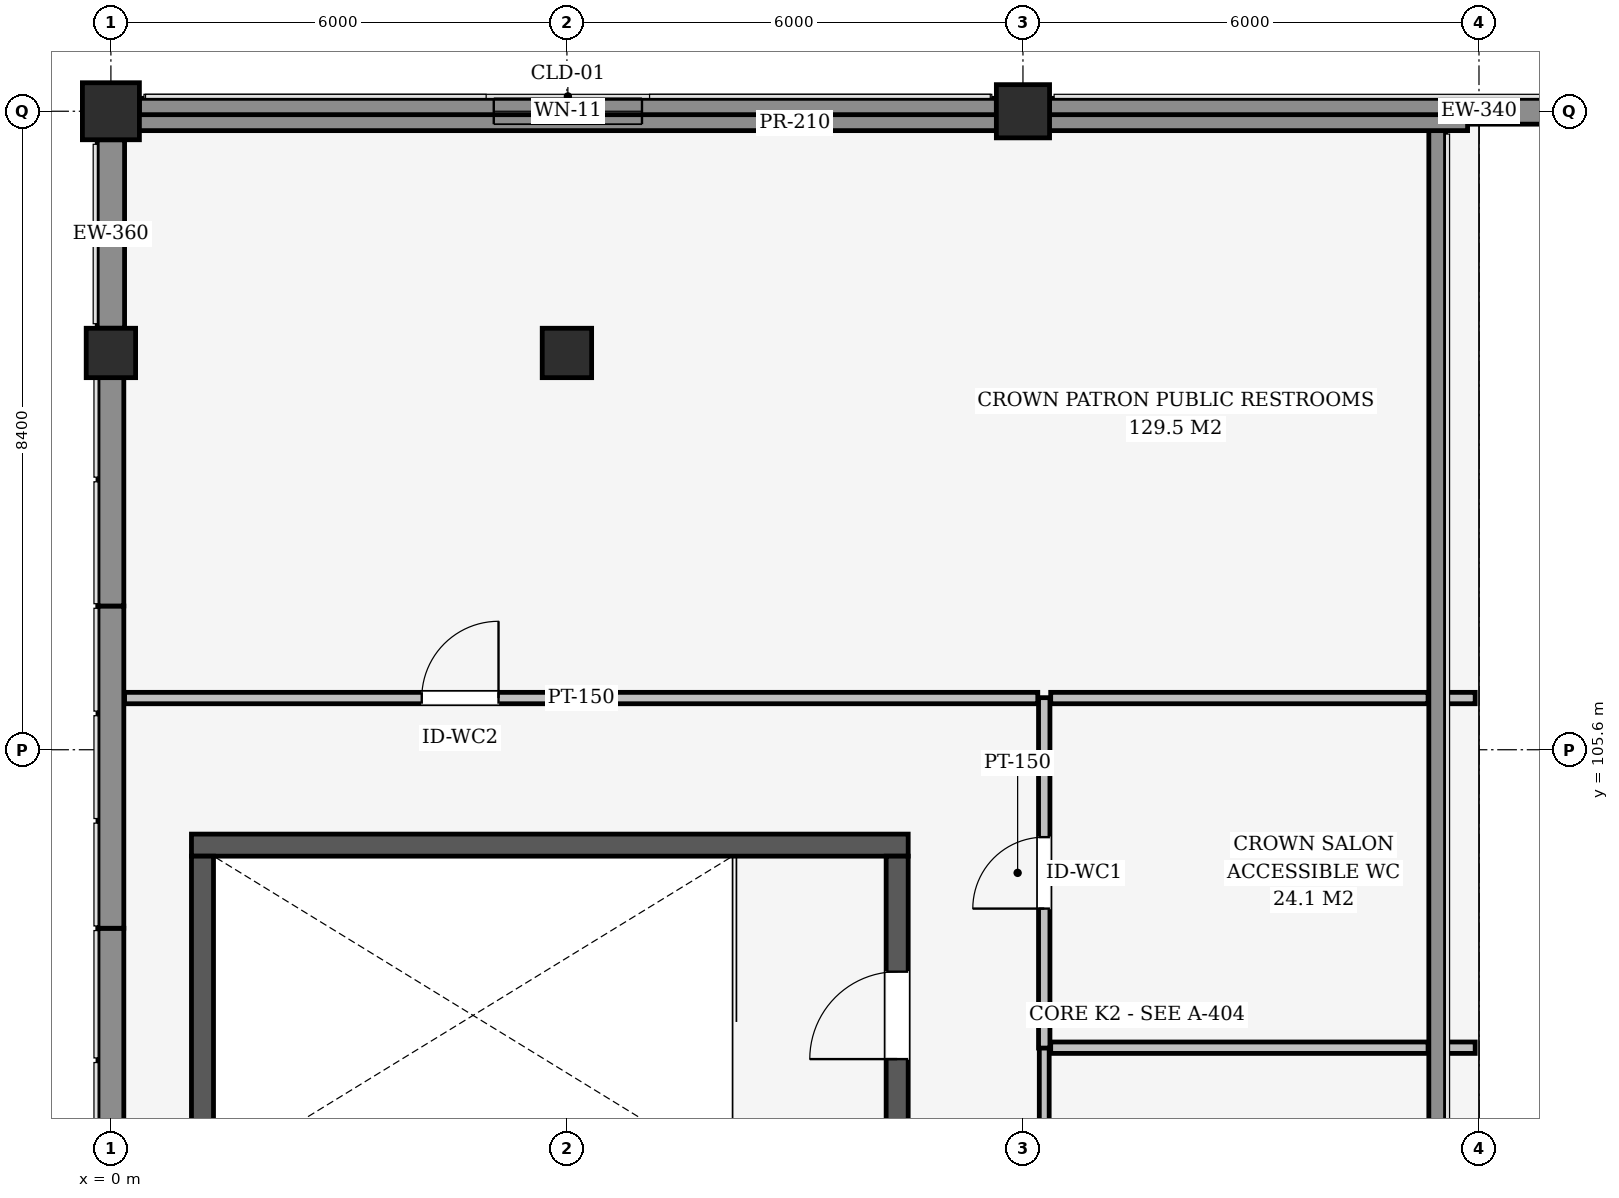
"""IFC4 building model, lengths in metres.
Left out: names, types, materials, properties, quantities, classifications, styles, units other than length and angle.
Written with IfcOpenShell. Run it as: python <this file> out.ifc"""

import sys

from ifc_helpers import new_model, si_unit, direction, frame, frame_2d, origin, origin_2d, place, context, subcontext, project, spatial, polyline, rectangle, outline, extrude, element, fill, save


model = new_model("IFC4")
c1 = context("Model", 3, precision=1e-05, world=origin(), true_north=direction((0.0, 1.0)))
c2 = subcontext(c1, "Body", "Model", "MODEL_VIEW")
j1 = project(units=[si_unit("LENGTHUNIT", "METRE"), si_unit("PLANEANGLEUNIT", "RADIAN")], contexts=[c1])
p1 = place(None, origin())
s1 = spatial("IfcSite", under=j1, at=p1, CompositionType="ELEMENT")
p2 = place(p1, origin())
s2 = spatial("IfcBuilding", under=s1, at=p2, CompositionType="ELEMENT")
p3 = place(p2, frame((0.0, 0.0, 22.2)))
s3 = spatial("IfcBuildingStorey", under=s2, at=p3, CompositionType="ELEMENT", Elevation=22.2)
p4 = place(p3, frame((0.0, 114.0, 0.0), z_axis=(0.0, 0.0, 1.0), x_axis=(1.0, 0.0, 0.0)))
e1 = element("IfcColumn", 1, at=p4, inside=s3, PredefinedType="COLUMN", context=c2, shape_type="SweptSolid", body=[
    extrude(rectangle(XDim=0.75, YDim=0.75, at=origin_2d()), origin(), (0.0, 0.0, 1.0), 4.37),
])
p5 = place(p3, frame((12.0, 114.0, 0.0), z_axis=(0.0, 0.0, 1.0), x_axis=(1.0, 0.0, 0.0)))
e2 = element("IfcColumn", 2, at=p5, inside=s3, PredefinedType="COLUMN", context=c2, shape_type="SweptSolid", body=[
    extrude(rectangle(XDim=0.7, YDim=0.7, at=origin_2d()), origin(), (0.0, 0.0, 1.0), 4.37),
])
for number, where, z_axis, x_axis in (
    (3, (0.0, 110.82, 0.0), (0.0, 0.0, 1.0), (1.0, 0.0, 0.0)),
    (4, (6.0, 110.82, 0.0), (0.0, 0.0, 1.0), (1.0, 0.0, 0.0)),
):
    element("IfcColumn", number, at=place(p3, frame(where, z_axis=z_axis, x_axis=x_axis)), inside=s3, PredefinedType="COLUMN", context=c2, shape_type="SweptSolid", body=[
        extrude(rectangle(XDim=0.65, YDim=0.65, at=origin_2d()), origin(), (0.0, 0.0, 1.0), 4.37),
    ])
p6 = place(p3, frame((0.375, 114.0, 0.0), z_axis=(0.0, 0.0, 1.0), x_axis=(1.0, 0.0, 0.0)))
e5 = element("IfcWall", 5, at=p6, inside=s3, PredefinedType="SOLIDWALL", context=c2, shape_type="SweptSolid", body=[
    extrude(rectangle(XDim=11.275, YDim=0.34, at=frame_2d((5.637, 0.0))), origin(), (0.0, 0.0, 1.0), 3.977),
])
p7 = place(p6, frame((4.663, 0.0, 0.85)))
e6 = element("IfcOpeningElement", 6, at=p7, cuts=e5, PredefinedType="OPENING", context=c2, shape_type="SweptSolid", body=[
    extrude(rectangle(XDim=1.95, YDim=1.75, at=frame_2d((0.975, 0.875))), frame((0.0, 0.18, 0.0), z_axis=(0.0, -1.0, 0.0), x_axis=(1.0, 0.0, 0.0)), (0.0, 0.0, 1.0), 0.36),
])
p8 = place(p3, frame((12.35, 114.0, 0.0), z_axis=(0.0, 0.0, 1.0), x_axis=(1.0, 0.0, 0.0)))
e7 = element("IfcWall", 7, at=p8, inside=s3, PredefinedType="SOLIDWALL", context=c2, shape_type="SweptSolid", body=[
    extrude(rectangle(XDim=11.3, YDim=0.34, at=frame_2d((5.65, 0.0))), origin(), (0.0, 0.0, 1.0), 4.5),
])
p9 = place(p3, frame((0.0, 111.145, 0.0), z_axis=(0.0, 0.0, 1.0), x_axis=(0.0, 1.0, 0.0)))
e8 = element("IfcWall", 8, at=p9, inside=s3, PredefinedType="SOLIDWALL", context=c2, shape_type="SweptSolid", body=[
    extrude(rectangle(XDim=2.48, YDim=0.36, at=frame_2d((1.24, 0.0))), origin(), (0.0, 0.0, 1.0), 3.738),
])
p10 = place(p3, frame((17.45, 113.76, 0.0), z_axis=(0.0, 0.0, 1.0), x_axis=(0.0, -1.0, 0.0)))
e9 = element("IfcWall", 9, at=p10, inside=s3, PredefinedType="SOLIDWALL", context=c2, shape_type="SweptSolid", body=[
    extrude(rectangle(XDim=45.12, YDim=0.22, at=frame_2d((22.56, 0.0))), origin(), (0.0, 0.0, 1.0), 3.15),
])
p11 = place(p3, frame((0.0, 98.042, 0.0), z_axis=(0.0, 0.0, 1.0), x_axis=(0.0, 1.0, 0.0)))
e10 = element("IfcWall", 10, at=p11, inside=s3, PredefinedType="SOLIDWALL", context=c2, shape_type="SweptSolid", body=[
    extrude(outline(polyline([(0.0, 0.0), (5.209, 0.0), (5.209, 8.163), (0.0, 10.859), (0.0, 0.0)])), frame((0.0, 0.17, 0.0), z_axis=(0.0, -1.0, 0.0), x_axis=(1.0, 0.0, 0.0)), (0.0, 0.0, 1.0), 0.34),
])
p12 = place(p3, frame((0.0, 103.251, 0.0), z_axis=(0.0, 0.0, 1.0), x_axis=(0.0, 1.0, 0.0)))
e11 = element("IfcWall", 11, at=p12, inside=s3, PredefinedType="SOLIDWALL", context=c2, shape_type="SweptSolid", body=[
    extrude(outline(polyline([(0.0, 0.0), (4.24, 0.0), (4.24, 4.463), (0.0, 8.163), (0.0, 0.0)])), frame((0.0, 0.17, 0.0), z_axis=(0.0, -1.0, 0.0), x_axis=(1.0, 0.0, 0.0)), (0.0, 0.0, 1.0), 0.34),
])
p13 = place(p3, frame((0.0, 107.491, 0.0), z_axis=(0.0, 0.0, 1.0), x_axis=(0.0, 1.0, 0.0)))
e12 = element("IfcWall", 12, at=p13, inside=s3, PredefinedType="SOLIDWALL", context=c2, shape_type="SweptSolid", body=[
    extrude(outline(polyline([(0.0, 0.0), (3.329, 0.0), (3.329, 0.25), (0.0, 4.463), (0.0, 0.0)])), frame((0.0, 0.17, 0.0), z_axis=(0.0, -1.0, 0.0), x_axis=(1.0, 0.0, 0.0)), (0.0, 0.0, 1.0), 0.34),
])
p14 = place(p3, frame((0.15, 113.85, 4.56), z_axis=(0.0, 0.0, 1.0), x_axis=(1.0, 0.0, 0.0)))
e13 = element("IfcWall", 13, at=p14, inside=s3, PredefinedType="PARAPET", context=c2, shape_type="SweptSolid", body=[
    extrude(rectangle(XDim=17.7, YDim=0.21, at=frame_2d((8.85, 0.0))), origin(), (0.0, 0.0, 1.0), 0.94),
])
p15 = place(p3, frame((1.06, 104.345, 0.0), z_axis=(0.0, 0.0, 1.0), x_axis=(1.0, 0.0, 0.0)))
e14 = element("IfcWall", 14, at=p15, inside=s3, PredefinedType="SHEAR", context=c2, shape_type="SweptSolid", body=[
    extrude(rectangle(XDim=9.43, YDim=0.29, at=frame_2d((4.715, 0.0))), origin(), (0.0, 0.0, 1.0), 4.5),
])
p16 = place(p3, frame((1.205, 100.01, 0.0), z_axis=(0.0, 0.0, 1.0), x_axis=(0.0, 1.0, 0.0)))
e15 = element("IfcWall", 15, at=p16, inside=s3, PredefinedType="SHEAR", context=c2, shape_type="SweptSolid", body=[
    extrude(rectangle(XDim=4.19, YDim=0.29, at=frame_2d((2.095, 0.0))), origin(), (0.0, 0.0, 1.0), 4.5),
])
p17 = place(p3, frame((10.345, 100.01, 0.0), z_axis=(0.0, 0.0, 1.0), x_axis=(0.0, 1.0, 0.0)))
e16 = element("IfcWall", 16, at=p17, inside=s3, PredefinedType="SHEAR", context=c2, shape_type="SweptSolid", body=[
    extrude(rectangle(XDim=4.19, YDim=0.29, at=frame_2d((2.095, 0.0))), origin(), (0.0, 0.0, 1.0), 4.5),
])
p18 = place(p17, frame((1.52, 0.0, 0.0)))
e17 = element("IfcOpeningElement", 17, at=p18, cuts=e16, PredefinedType="OPENING", context=c2, shape_type="SweptSolid", body=[
    extrude(rectangle(XDim=1.15, YDim=2.15, at=frame_2d((0.575, 1.075))), frame((0.0, 0.155, 0.0), z_axis=(0.0, -1.0, 0.0), x_axis=(1.0, 0.0, 0.0)), (0.0, 0.0, 1.0), 0.31),
])
p19 = place(p3, frame((12.28, 97.533, 0.0), z_axis=(0.0, 0.0, 1.0), x_axis=(0.0, 1.0, 0.0)))
e18 = element("IfcWall", 18, at=p19, inside=s3, PredefinedType="PARTITIONING", context=c2, shape_type="SweptSolid", body=[
    extrude(rectangle(XDim=4.152, YDim=0.13, at=frame_2d((2.076, 0.0))), origin(), (0.0, 0.0, 1.0), 4.5),
])
p20 = place(p3, frame((12.28, 101.675, 0.0), z_axis=(0.0, 0.0, 1.0), x_axis=(0.0, 1.0, 0.0)))
e19 = element("IfcWall", 19, at=p20, inside=s3, PredefinedType="PARTITIONING", context=c2, shape_type="SweptSolid", body=[
    extrude(rectangle(XDim=4.61, YDim=0.15, at=frame_2d((2.305, 0.0))), origin(), (0.0, 0.0, 1.0), 4.5),
])
p21 = place(p20, frame((1.835, 0.0, 0.0)))
e20 = element("IfcOpeningElement", 20, at=p21, cuts=e19, PredefinedType="OPENING", context=c2, shape_type="SweptSolid", body=[
    extrude(rectangle(XDim=0.94, YDim=2.1, at=frame_2d((0.47, 1.05))), frame((0.0, 0.085, 0.0), z_axis=(0.0, -1.0, 0.0), x_axis=(1.0, 0.0, 0.0)), (0.0, 0.0, 1.0), 0.17),
])
p22 = place(p3, frame((0.18, 106.28, 0.0), z_axis=(0.0, 0.0, 1.0), x_axis=(1.0, 0.0, 0.0)))
e21 = element("IfcWall", 21, at=p22, inside=s3, PredefinedType="PARTITIONING", context=c2, shape_type="SweptSolid", body=[
    extrude(rectangle(XDim=12.015, YDim=0.15, at=frame_2d((6.008, 0.0))), origin(), (0.0, 0.0, 1.0), 4.5),
])
p23 = place(p22, frame((3.91, 0.0, 0.0)))
e22 = element("IfcOpeningElement", 22, at=p23, cuts=e21, PredefinedType="OPENING", context=c2, shape_type="SweptSolid", body=[
    extrude(rectangle(XDim=1.01, YDim=2.1, at=frame_2d((0.505, 1.05))), frame((0.0, 0.085, 0.0), z_axis=(0.0, -1.0, 0.0), x_axis=(1.0, 0.0, 0.0)), (0.0, 0.0, 1.0), 0.17),
])
p24 = place(p3, frame((12.365, 101.68, 0.0), z_axis=(0.0, 0.0, 1.0), x_axis=(1.0, 0.0, 0.0)))
e23 = element("IfcWall", 23, at=p24, inside=s3, PredefinedType="PARTITIONING", context=c2, shape_type="SweptSolid", body=[
    extrude(rectangle(XDim=4.965, YDim=0.15, at=frame_2d((2.482, 0.0))), origin(), (0.0, 0.0, 1.0), 4.5),
])
p25 = place(p3, frame((17.57, 101.68, 0.0), z_axis=(0.0, 0.0, 1.0), x_axis=(1.0, 0.0, 0.0)))
e24 = element("IfcWall", 24, at=p25, inside=s3, PredefinedType="PARTITIONING", context=c2, shape_type="SweptSolid", body=[
    extrude(rectangle(XDim=0.38, YDim=0.15, at=frame_2d((0.19, 0.0))), origin(), (0.0, 0.0, 1.0), 4.5),
])
p26 = place(p3, frame((12.365, 106.28, 0.0), z_axis=(0.0, 0.0, 1.0), x_axis=(1.0, 0.0, 0.0)))
e25 = element("IfcWall", 25, at=p26, inside=s3, PredefinedType="PARTITIONING", context=c2, shape_type="SweptSolid", body=[
    extrude(rectangle(XDim=4.965, YDim=0.15, at=frame_2d((2.482, 0.0))), origin(), (0.0, 0.0, 1.0), 4.5),
])
p27 = place(p3, frame((17.57, 106.28, 0.0), z_axis=(0.0, 0.0, 1.0), x_axis=(1.0, 0.0, 0.0)))
e26 = element("IfcWall", 26, at=p27, inside=s3, PredefinedType="PARTITIONING", context=c2, shape_type="SweptSolid", body=[
    extrude(rectangle(XDim=0.38, YDim=0.15, at=frame_2d((0.19, 0.0))), origin(), (0.0, 0.0, 1.0), 4.5),
])
p28 = place(p7, origin())
e27 = element("IfcWindow", 27, at=p28, inside=s3, PartitioningType="SINGLE_PANEL", PredefinedType="WINDOW", context=c2, shape_type="SweptSolid", body=[
    extrude(rectangle(XDim=1.95, YDim=1.75, at=frame_2d((0.975, 0.875))), frame((0.0, 0.03, 0.0), z_axis=(0.0, -1.0, 0.0), x_axis=(1.0, 0.0, 0.0)), (0.0, 0.0, 1.0), 0.06),
])
fill(e6, e27)
p29 = place(p18, origin())
e28 = element("IfcDoor", 28, at=p29, inside=s3, OperationType="SINGLE_SWING_LEFT", PredefinedType="DOOR", context=c2, shape_type="SweptSolid", body=[
    extrude(rectangle(XDim=1.15, YDim=2.15, at=frame_2d((0.575, 1.075))), frame((0.0, 0.025, 0.0), z_axis=(0.0, -1.0, 0.0), x_axis=(1.0, 0.0, 0.0)), (0.0, 0.0, 1.0), 0.05),
])
fill(e17, e28)
p30 = place(p21, origin())
e29 = element("IfcDoor", 29, at=p30, inside=s3, OperationType="SINGLE_SWING_LEFT", PredefinedType="DOOR", context=c2, shape_type="SweptSolid", body=[
    extrude(rectangle(XDim=0.94, YDim=2.1, at=frame_2d((0.47, 1.05))), frame((0.0, 0.025, 0.0), z_axis=(0.0, -1.0, 0.0), x_axis=(1.0, 0.0, 0.0)), (0.0, 0.0, 1.0), 0.05),
])
fill(e20, e29)
p31 = place(p23, origin())
e30 = element("IfcDoor", 30, at=p31, inside=s3, OperationType="SINGLE_SWING_RIGHT", PredefinedType="DOOR", context=c2, shape_type="SweptSolid", body=[
    extrude(rectangle(XDim=1.01, YDim=2.1, at=frame_2d((0.505, 1.05))), frame((0.0, 0.025, 0.0), z_axis=(0.0, -1.0, 0.0), x_axis=(1.0, 0.0, 0.0)), (0.0, 0.0, 1.0), 0.05),
])
fill(e22, e30)
save(model, sys.argv[1])
